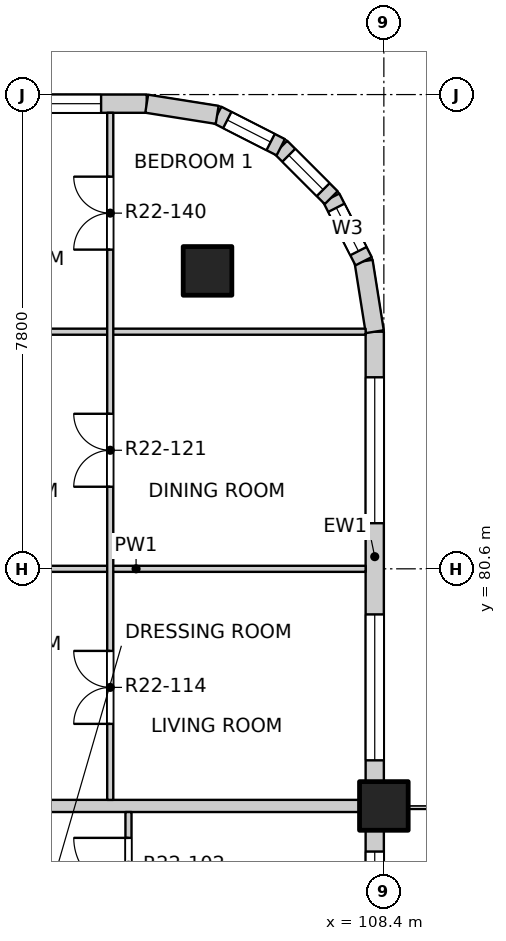
"""IFC4 building model, lengths in metres.
Left out: names, types, materials, properties, quantities, classifications, styles, units other than length and angle.
Written with IfcOpenShell. Run it as: python <this file> out.ifc"""

import sys

from ifc_helpers import new_model, si_unit, direction, frame, frame_2d, origin, origin_2d, place, context, subcontext, project, spatial, rectangle, extrude, element, fill, save


model = new_model("IFC4")
c1 = context("Model", 3, precision=1e-05, world=origin(), true_north=direction((0.0, 1.0)))
c2 = subcontext(c1, "Body", "Model", "MODEL_VIEW")
j1 = project(units=[si_unit("LENGTHUNIT", "METRE"), si_unit("PLANEANGLEUNIT", "RADIAN")], contexts=[c1])
p1 = place(None, origin())
s1 = spatial("IfcSite", under=j1, at=p1, CompositionType="ELEMENT")
p2 = place(p1, origin())
s2 = spatial("IfcBuilding", under=s1, at=p2, CompositionType="ELEMENT")
p3 = place(p2, frame((0.0, 0.0, 231.3)))
s3 = spatial("IfcBuildingStorey", under=s2, at=p3, CompositionType="ELEMENT", Elevation=231.3)
for number, where, z_axis, x_axis in (
    (1, (105.5, 85.5, -0.25), (0.0, 0.0, 1.0), (1.0, 0.0, 0.0)),
    (2, (108.4, 76.7, -0.25), (0.0, 0.0, 1.0), (1.0, 0.0, 0.0)),
):
    element("IfcColumn", number, at=place(p3, frame(where, z_axis=z_axis, x_axis=x_axis)), inside=s3, PredefinedType="COLUMN", context=c2, shape_type="SweptSolid", body=[
        extrude(rectangle(XDim=0.8, YDim=0.8, at=origin_2d()), origin(), (0.0, 0.0, 1.0), 3.4),
    ])
p4 = place(p3, frame((108.25, 69.3, 0.0), z_axis=(0.0, 0.0, 1.0), x_axis=(0.0, 1.0, 0.0)))
e3 = element("IfcWall", 3, at=p4, inside=s3, PredefinedType="SOLIDWALL", context=c2, shape_type="SweptSolid", body=[
    extrude(rectangle(XDim=7.0, YDim=0.3, at=frame_2d((3.5, 0.0))), origin(), (0.0, 0.0, 1.0), 2.7),
])
p5 = place(p4, frame((0.65, 0.0, 0.0)))
e4 = element("IfcOpeningElement", 4, at=p5, cuts=e3, PredefinedType="OPENING", context=c2, shape_type="SweptSolid", body=[
    extrude(rectangle(XDim=1.8, YDim=2.4, at=frame_2d((0.9, 1.2))), frame((0.0, 0.16, 0.0), z_axis=(0.0, -1.0, 0.0), x_axis=(1.0, 0.0, 0.0)), (0.0, 0.0, 1.0), 0.32),
])
p6 = place(p4, frame((4.25, 0.0, 0.9)))
e5 = element("IfcOpeningElement", 5, at=p6, cuts=e3, PredefinedType="OPENING", context=c2, shape_type="SweptSolid", body=[
    extrude(rectangle(XDim=2.4, YDim=1.8, at=frame_2d((1.2, 0.9))), frame((0.0, 0.16, 0.0), z_axis=(0.0, -1.0, 0.0), x_axis=(1.0, 0.0, 0.0)), (0.0, 0.0, 1.0), 0.32),
])
p7 = place(p3, frame((108.25, 77.1, 0.0), z_axis=(0.0, 0.0, 1.0), x_axis=(0.0, 1.0, 0.0)))
e6 = element("IfcWall", 6, at=p7, inside=s3, PredefinedType="SOLIDWALL", context=c2, shape_type="SweptSolid", body=[
    extrude(rectangle(XDim=7.4, YDim=0.3, at=frame_2d((3.7, 0.0))), origin(), (0.0, 0.0, 1.0), 2.7),
])
p8 = place(p7, frame((0.35, 0.0, 0.9)))
e7 = element("IfcOpeningElement", 7, at=p8, cuts=e6, PredefinedType="OPENING", context=c2, shape_type="SweptSolid", body=[
    extrude(rectangle(XDim=2.4, YDim=1.8, at=frame_2d((1.2, 0.9))), frame((0.0, 0.16, 0.0), z_axis=(0.0, -1.0, 0.0), x_axis=(1.0, 0.0, 0.0)), (0.0, 0.0, 1.0), 0.32),
])
p9 = place(p7, frame((4.25, 0.0, 0.9)))
e8 = element("IfcOpeningElement", 8, at=p9, cuts=e6, PredefinedType="OPENING", context=c2, shape_type="SweptSolid", body=[
    extrude(rectangle(XDim=2.4, YDim=1.8, at=frame_2d((1.2, 0.9))), frame((0.0, 0.16, 0.0), z_axis=(0.0, -1.0, 0.0), x_axis=(1.0, 0.0, 0.0)), (0.0, 0.0, 1.0), 0.32),
])
p10 = place(p3, frame((97.1, 88.25, 0.0), z_axis=(0.0, 0.0, 1.0), x_axis=(1.0, 0.0, 0.0)))
e9 = element("IfcWall", 9, at=p10, inside=s3, PredefinedType="SOLIDWALL", context=c2, shape_type="SweptSolid", body=[
    extrude(rectangle(XDim=7.4, YDim=0.3, at=frame_2d((3.7, 0.0))), origin(), (0.0, 0.0, 1.0), 2.7),
])
p11 = place(p10, frame((0.35, 0.0, 0.9)))
e10 = element("IfcOpeningElement", 10, at=p11, cuts=e9, PredefinedType="OPENING", context=c2, shape_type="SweptSolid", body=[
    extrude(rectangle(XDim=2.4, YDim=1.8, at=frame_2d((1.2, 0.9))), frame((0.0, 0.16, 0.0), z_axis=(0.0, -1.0, 0.0), x_axis=(1.0, 0.0, 0.0)), (0.0, 0.0, 1.0), 0.32),
])
p12 = place(p10, frame((4.25, 0.0, 0.9)))
e11 = element("IfcOpeningElement", 11, at=p12, cuts=e9, PredefinedType="OPENING", context=c2, shape_type="SweptSolid", body=[
    extrude(rectangle(XDim=2.4, YDim=1.8, at=frame_2d((1.2, 0.9))), frame((0.0, 0.16, 0.0), z_axis=(0.0, -1.0, 0.0), x_axis=(1.0, 0.0, 0.0)), (0.0, 0.0, 1.0), 0.32),
])
p13 = place(p3, frame((108.25, 84.5, 0.0), z_axis=(0.0, 0.0, 1.0), x_axis=(-0.156496880861, 0.987678452879, 0.0)))
e12 = element("IfcWall", 12, at=p13, inside=s3, PredefinedType="SOLIDWALL", context=c2, shape_type="SweptSolid", body=[
    extrude(rectangle(XDim=1.173, YDim=0.3, at=frame_2d((0.586, 0.0))), origin(), (0.0, 0.0, 1.0), 2.7),
])
p14 = place(p3, frame((108.066, 85.659, 0.0), z_axis=(0.0, 0.0, 1.0), x_axis=(-0.454025524128, 0.890988677504, 0.0)))
e13 = element("IfcWall", 13, at=p14, inside=s3, PredefinedType="SOLIDWALL", context=c2, shape_type="SweptSolid", body=[
    extrude(rectangle(XDim=1.173, YDim=0.3, at=frame_2d((0.587, 0.0))), origin(), (0.0, 0.0, 1.0), 2.7),
])
p15 = place(p14, frame((0.187, 0.0, 0.9)))
e14 = element("IfcOpeningElement", 14, at=p15, cuts=e13, PredefinedType="OPENING", context=c2, shape_type="SweptSolid", body=[
    extrude(rectangle(XDim=0.8, YDim=1.2, at=frame_2d((0.4, 0.6))), frame((0.0, 0.16, 0.0), z_axis=(0.0, -1.0, 0.0), x_axis=(1.0, 0.0, 0.0)), (0.0, 0.0, 1.0), 0.32),
])
p16 = place(p3, frame((107.534, 86.704, 0.0), z_axis=(0.0, 0.0, 1.0), x_axis=(-0.707106781187, 0.707106781187, 0.0)))
e15 = element("IfcWall", 15, at=p16, inside=s3, PredefinedType="SOLIDWALL", context=c2, shape_type="SweptSolid", body=[
    extrude(rectangle(XDim=1.173, YDim=0.3, at=frame_2d((0.586, 0.0))), origin(), (0.0, 0.0, 1.0), 2.7),
])
p17 = place(p16, frame((0.187, 0.0, 0.9)))
e16 = element("IfcOpeningElement", 16, at=p17, cuts=e15, PredefinedType="OPENING", context=c2, shape_type="SweptSolid", body=[
    extrude(rectangle(XDim=0.8, YDim=1.2, at=frame_2d((0.4, 0.6))), frame((0.0, 0.16, 0.0), z_axis=(0.0, -1.0, 0.0), x_axis=(1.0, 0.0, 0.0)), (0.0, 0.0, 1.0), 0.32),
])
p18 = place(p3, frame((106.704, 87.534, 0.0), z_axis=(0.0, 0.0, 1.0), x_axis=(-0.890988677504, 0.454025524128, 0.0)))
e17 = element("IfcWall", 17, at=p18, inside=s3, PredefinedType="SOLIDWALL", context=c2, shape_type="SweptSolid", body=[
    extrude(rectangle(XDim=1.173, YDim=0.3, at=frame_2d((0.587, 0.0))), origin(), (0.0, 0.0, 1.0), 2.7),
])
p19 = place(p18, frame((0.187, 0.0, 0.9)))
e18 = element("IfcOpeningElement", 18, at=p19, cuts=e17, PredefinedType="OPENING", context=c2, shape_type="SweptSolid", body=[
    extrude(rectangle(XDim=0.8, YDim=1.2, at=frame_2d((0.4, 0.6))), frame((0.0, 0.16, 0.0), z_axis=(0.0, -1.0, 0.0), x_axis=(1.0, 0.0, 0.0)), (0.0, 0.0, 1.0), 0.32),
])
p20 = place(p3, frame((105.659, 88.066, 0.0), z_axis=(0.0, 0.0, 1.0), x_axis=(-0.987678452879, 0.156496880861, 0.0)))
e19 = element("IfcWall", 19, at=p20, inside=s3, PredefinedType="SOLIDWALL", context=c2, shape_type="SweptSolid", body=[
    extrude(rectangle(XDim=1.173, YDim=0.3, at=frame_2d((0.586, 0.0))), origin(), (0.0, 0.0, 1.0), 2.7),
])
p21 = place(p3, frame((96.6, 76.7, 0.0), z_axis=(0.0, 0.0, 1.0), x_axis=(1.0, 0.0, 0.0)))
e20 = element("IfcWall", 20, at=p21, inside=s3, PredefinedType="PARTITIONING", context=c2, shape_type="SweptSolid", body=[
    extrude(rectangle(XDim=11.5, YDim=0.2, at=frame_2d((5.75, 0.0))), origin(), (0.0, 0.0, 1.0), 2.55),
])
p22 = place(p3, frame((100.55, 80.6, 0.0), z_axis=(0.0, 0.0, 1.0), x_axis=(1.0, 0.0, 0.0)))
e21 = element("IfcWall", 21, at=p22, inside=s3, PredefinedType="PARTITIONING", context=c2, shape_type="SweptSolid", body=[
    extrude(rectangle(XDim=7.55, YDim=0.1, at=frame_2d((3.775, 0.0))), origin(), (0.0, 0.0, 1.0), 3.15),
])
p23 = place(p3, frame((96.6, 84.5, 0.0), z_axis=(0.0, 0.0, 1.0), x_axis=(1.0, 0.0, 0.0)))
e22 = element("IfcWall", 22, at=p23, inside=s3, PredefinedType="PARTITIONING", context=c2, shape_type="SweptSolid", body=[
    extrude(rectangle(XDim=11.5, YDim=0.1, at=frame_2d((5.75, 0.0))), origin(), (0.0, 0.0, 1.0), 3.15),
])
p24 = place(p23, frame((2.635, 0.0, 0.0)))
e23 = element("IfcOpeningElement", 23, at=p24, cuts=e22, PredefinedType="OPENING", context=c2, shape_type="SweptSolid", body=[
    extrude(rectangle(XDim=0.9, YDim=2.1, at=frame_2d((0.45, 1.05))), frame((0.0, 0.06, 0.0), z_axis=(0.0, -1.0, 0.0), x_axis=(1.0, 0.0, 0.0)), (0.0, 0.0, 1.0), 0.12),
])
p25 = place(p3, frame((103.9, 76.8, 0.0), z_axis=(0.0, 0.0, 1.0), x_axis=(0.0, 1.0, 0.0)))
e24 = element("IfcWall", 24, at=p25, inside=s3, PredefinedType="PARTITIONING", context=c2, shape_type="SweptSolid", body=[
    extrude(rectangle(XDim=11.3, YDim=0.1, at=frame_2d((5.65, 0.0))), origin(), (0.0, 0.0, 1.0), 3.15),
])
p26 = place(p25, frame((1.25, 0.0, 0.0)))
e25 = element("IfcOpeningElement", 25, at=p26, cuts=e24, PredefinedType="OPENING", context=c2, shape_type="SweptSolid", body=[
    extrude(rectangle(XDim=1.2, YDim=2.1, at=frame_2d((0.6, 1.05))), frame((0.0, 0.06, 0.0), z_axis=(0.0, -1.0, 0.0), x_axis=(1.0, 0.0, 0.0)), (0.0, 0.0, 1.0), 0.12),
])
p27 = place(p25, frame((5.15, 0.0, 0.0)))
e26 = element("IfcOpeningElement", 26, at=p27, cuts=e24, PredefinedType="OPENING", context=c2, shape_type="SweptSolid", body=[
    extrude(rectangle(XDim=1.2, YDim=2.1, at=frame_2d((0.6, 1.05))), frame((0.0, 0.06, 0.0), z_axis=(0.0, -1.0, 0.0), x_axis=(1.0, 0.0, 0.0)), (0.0, 0.0, 1.0), 0.12),
])
p28 = place(p25, frame((9.05, 0.0, 0.0)))
e27 = element("IfcOpeningElement", 27, at=p28, cuts=e24, PredefinedType="OPENING", context=c2, shape_type="SweptSolid", body=[
    extrude(rectangle(XDim=1.2, YDim=2.1, at=frame_2d((0.6, 1.05))), frame((0.0, 0.06, 0.0), z_axis=(0.0, -1.0, 0.0), x_axis=(1.0, 0.0, 0.0)), (0.0, 0.0, 1.0), 0.12),
])
p29 = place(p3, frame((104.2, 41.9, 0.0), z_axis=(0.0, 0.0, 1.0), x_axis=(0.0, 1.0, 0.0)))
e28 = element("IfcWall", 28, at=p29, inside=s3, PredefinedType="PARTITIONING", context=c2, shape_type="SweptSolid", body=[
    extrude(rectangle(XDim=34.7, YDim=0.1, at=frame_2d((17.35, 0.0))), origin(), (0.0, 0.0, 1.0), 3.15),
])
p30 = place(p29, frame((1.05, 0.0, 0.0)))
e29 = element("IfcOpeningElement", 29, at=p30, cuts=e28, PredefinedType="OPENING", context=c2, shape_type="SweptSolid", body=[
    extrude(rectangle(XDim=1.2, YDim=2.1, at=frame_2d((0.6, 1.05))), frame((0.0, 0.06, 0.0), z_axis=(0.0, -1.0, 0.0), x_axis=(1.0, 0.0, 0.0)), (0.0, 0.0, 1.0), 0.12),
])
p31 = place(p29, frame((4.125, 0.0, 0.0)))
e30 = element("IfcOpeningElement", 30, at=p31, cuts=e28, PredefinedType="OPENING", context=c2, shape_type="SweptSolid", body=[
    extrude(rectangle(XDim=0.9, YDim=2.1, at=frame_2d((0.45, 1.05))), frame((0.0, 0.06, 0.0), z_axis=(0.0, -1.0, 0.0), x_axis=(1.0, 0.0, 0.0)), (0.0, 0.0, 1.0), 0.12),
])
p32 = place(p29, frame((6.075, 0.0, 0.0)))
e31 = element("IfcOpeningElement", 31, at=p32, cuts=e28, PredefinedType="OPENING", context=c2, shape_type="SweptSolid", body=[
    extrude(rectangle(XDim=0.9, YDim=2.1, at=frame_2d((0.45, 1.05))), frame((0.0, 0.06, 0.0), z_axis=(0.0, -1.0, 0.0), x_axis=(1.0, 0.0, 0.0)), (0.0, 0.0, 1.0), 0.12),
])
p33 = place(p29, frame((8.85, 0.0, 0.0)))
e32 = element("IfcOpeningElement", 32, at=p33, cuts=e28, PredefinedType="OPENING", context=c2, shape_type="SweptSolid", body=[
    extrude(rectangle(XDim=1.2, YDim=2.1, at=frame_2d((0.6, 1.05))), frame((0.0, 0.06, 0.0), z_axis=(0.0, -1.0, 0.0), x_axis=(1.0, 0.0, 0.0)), (0.0, 0.0, 1.0), 0.12),
])
p34 = place(p29, frame((12.75, 0.0, 0.0)))
e33 = element("IfcOpeningElement", 33, at=p34, cuts=e28, PredefinedType="OPENING", context=c2, shape_type="SweptSolid", body=[
    extrude(rectangle(XDim=1.2, YDim=2.1, at=frame_2d((0.6, 1.05))), frame((0.0, 0.06, 0.0), z_axis=(0.0, -1.0, 0.0), x_axis=(1.0, 0.0, 0.0)), (0.0, 0.0, 1.0), 0.12),
])
p35 = place(p29, frame((15.825, 0.0, 0.0)))
e34 = element("IfcOpeningElement", 34, at=p35, cuts=e28, PredefinedType="OPENING", context=c2, shape_type="SweptSolid", body=[
    extrude(rectangle(XDim=0.9, YDim=2.1, at=frame_2d((0.45, 1.05))), frame((0.0, 0.06, 0.0), z_axis=(0.0, -1.0, 0.0), x_axis=(1.0, 0.0, 0.0)), (0.0, 0.0, 1.0), 0.12),
])
p36 = place(p29, frame((17.775, 0.0, 0.0)))
e35 = element("IfcOpeningElement", 35, at=p36, cuts=e28, PredefinedType="OPENING", context=c2, shape_type="SweptSolid", body=[
    extrude(rectangle(XDim=0.9, YDim=2.1, at=frame_2d((0.45, 1.05))), frame((0.0, 0.06, 0.0), z_axis=(0.0, -1.0, 0.0), x_axis=(1.0, 0.0, 0.0)), (0.0, 0.0, 1.0), 0.12),
])
p37 = place(p29, frame((19.725, 0.0, 0.0)))
e36 = element("IfcOpeningElement", 36, at=p37, cuts=e28, PredefinedType="OPENING", context=c2, shape_type="SweptSolid", body=[
    extrude(rectangle(XDim=0.9, YDim=2.1, at=frame_2d((0.45, 1.05))), frame((0.0, 0.06, 0.0), z_axis=(0.0, -1.0, 0.0), x_axis=(1.0, 0.0, 0.0)), (0.0, 0.0, 1.0), 0.12),
])
p38 = place(p29, frame((21.675, 0.0, 0.0)))
e37 = element("IfcOpeningElement", 37, at=p38, cuts=e28, PredefinedType="OPENING", context=c2, shape_type="SweptSolid", body=[
    extrude(rectangle(XDim=0.9, YDim=2.1, at=frame_2d((0.45, 1.05))), frame((0.0, 0.06, 0.0), z_axis=(0.0, -1.0, 0.0), x_axis=(1.0, 0.0, 0.0)), (0.0, 0.0, 1.0), 0.12),
])
p39 = place(p29, frame((23.625, 0.0, 0.0)))
e38 = element("IfcOpeningElement", 38, at=p39, cuts=e28, PredefinedType="OPENING", context=c2, shape_type="SweptSolid", body=[
    extrude(rectangle(XDim=0.9, YDim=2.1, at=frame_2d((0.45, 1.05))), frame((0.0, 0.06, 0.0), z_axis=(0.0, -1.0, 0.0), x_axis=(1.0, 0.0, 0.0)), (0.0, 0.0, 1.0), 0.12),
])
p40 = place(p29, frame((25.575, 0.0, 0.0)))
e39 = element("IfcOpeningElement", 39, at=p40, cuts=e28, PredefinedType="OPENING", context=c2, shape_type="SweptSolid", body=[
    extrude(rectangle(XDim=0.9, YDim=2.1, at=frame_2d((0.45, 1.05))), frame((0.0, 0.06, 0.0), z_axis=(0.0, -1.0, 0.0), x_axis=(1.0, 0.0, 0.0)), (0.0, 0.0, 1.0), 0.12),
])
p41 = place(p29, frame((28.35, 0.0, 0.0)))
e40 = element("IfcOpeningElement", 40, at=p41, cuts=e28, PredefinedType="OPENING", context=c2, shape_type="SweptSolid", body=[
    extrude(rectangle(XDim=1.2, YDim=2.1, at=frame_2d((0.6, 1.05))), frame((0.0, 0.06, 0.0), z_axis=(0.0, -1.0, 0.0), x_axis=(1.0, 0.0, 0.0)), (0.0, 0.0, 1.0), 0.12),
])
p42 = place(p29, frame((31.425, 0.0, 0.0)))
e41 = element("IfcOpeningElement", 41, at=p42, cuts=e28, PredefinedType="OPENING", context=c2, shape_type="SweptSolid", body=[
    extrude(rectangle(XDim=0.9, YDim=2.1, at=frame_2d((0.45, 1.05))), frame((0.0, 0.06, 0.0), z_axis=(0.0, -1.0, 0.0), x_axis=(1.0, 0.0, 0.0)), (0.0, 0.0, 1.0), 0.12),
])
p43 = place(p29, frame((33.375, 0.0, 0.0)))
e42 = element("IfcOpeningElement", 42, at=p43, cuts=e28, PredefinedType="OPENING", context=c2, shape_type="SweptSolid", body=[
    extrude(rectangle(XDim=0.9, YDim=2.1, at=frame_2d((0.45, 1.05))), frame((0.0, 0.06, 0.0), z_axis=(0.0, -1.0, 0.0), x_axis=(1.0, 0.0, 0.0)), (0.0, 0.0, 1.0), 0.12),
])
p44 = place(p6, origin())
e43 = element("IfcWindow", 43, at=p44, inside=s3, PartitioningType="DOUBLE_PANEL_VERTICAL", PredefinedType="WINDOW", context=c2, shape_type="SweptSolid", body=[
    extrude(rectangle(XDim=2.4, YDim=1.8, at=frame_2d((1.2, 0.9))), frame((0.0, 0.03, 0.0), z_axis=(0.0, -1.0, 0.0), x_axis=(1.0, 0.0, 0.0)), (0.0, 0.0, 1.0), 0.06),
])
fill(e5, e43)
p45 = place(p8, origin())
e44 = element("IfcWindow", 44, at=p45, inside=s3, PartitioningType="DOUBLE_PANEL_VERTICAL", PredefinedType="WINDOW", context=c2, shape_type="SweptSolid", body=[
    extrude(rectangle(XDim=2.4, YDim=1.8, at=frame_2d((1.2, 0.9))), frame((0.0, 0.03, 0.0), z_axis=(0.0, -1.0, 0.0), x_axis=(1.0, 0.0, 0.0)), (0.0, 0.0, 1.0), 0.06),
])
fill(e7, e44)
p46 = place(p9, origin())
e45 = element("IfcWindow", 45, at=p46, inside=s3, PartitioningType="DOUBLE_PANEL_VERTICAL", PredefinedType="WINDOW", context=c2, shape_type="SweptSolid", body=[
    extrude(rectangle(XDim=2.4, YDim=1.8, at=frame_2d((1.2, 0.9))), frame((0.0, 0.03, 0.0), z_axis=(0.0, -1.0, 0.0), x_axis=(1.0, 0.0, 0.0)), (0.0, 0.0, 1.0), 0.06),
])
fill(e8, e45)
p47 = place(p12, origin())
e46 = element("IfcWindow", 46, at=p47, inside=s3, PartitioningType="DOUBLE_PANEL_VERTICAL", PredefinedType="WINDOW", context=c2, shape_type="SweptSolid", body=[
    extrude(rectangle(XDim=2.4, YDim=1.8, at=frame_2d((1.2, 0.9))), frame((0.0, 0.03, 0.0), z_axis=(0.0, -1.0, 0.0), x_axis=(1.0, 0.0, 0.0)), (0.0, 0.0, 1.0), 0.06),
])
fill(e11, e46)
p48 = place(p15, origin())
e47 = element("IfcWindow", 47, at=p48, inside=s3, PartitioningType="SINGLE_PANEL", PredefinedType="WINDOW", context=c2, shape_type="SweptSolid", body=[
    extrude(rectangle(XDim=0.8, YDim=1.2, at=frame_2d((0.4, 0.6))), frame((0.0, 0.03, 0.0), z_axis=(0.0, -1.0, 0.0), x_axis=(1.0, 0.0, 0.0)), (0.0, 0.0, 1.0), 0.06),
])
fill(e14, e47)
p49 = place(p17, origin())
e48 = element("IfcWindow", 48, at=p49, inside=s3, PartitioningType="SINGLE_PANEL", PredefinedType="WINDOW", context=c2, shape_type="SweptSolid", body=[
    extrude(rectangle(XDim=0.8, YDim=1.2, at=frame_2d((0.4, 0.6))), frame((0.0, 0.03, 0.0), z_axis=(0.0, -1.0, 0.0), x_axis=(1.0, 0.0, 0.0)), (0.0, 0.0, 1.0), 0.06),
])
fill(e16, e48)
p50 = place(p19, origin())
e49 = element("IfcWindow", 49, at=p50, inside=s3, PartitioningType="SINGLE_PANEL", PredefinedType="WINDOW", context=c2, shape_type="SweptSolid", body=[
    extrude(rectangle(XDim=0.8, YDim=1.2, at=frame_2d((0.4, 0.6))), frame((0.0, 0.03, 0.0), z_axis=(0.0, -1.0, 0.0), x_axis=(1.0, 0.0, 0.0)), (0.0, 0.0, 1.0), 0.06),
])
fill(e18, e49)
p51 = place(p43, origin())
e50 = element("IfcDoor", 50, at=p51, inside=s3, OperationType="SINGLE_SWING_RIGHT", PredefinedType="DOOR", context=c2, shape_type="SweptSolid", body=[
    extrude(rectangle(XDim=0.9, YDim=2.1, at=frame_2d((0.45, 1.05))), frame((0.0, 0.025, 0.0), z_axis=(0.0, -1.0, 0.0), x_axis=(1.0, 0.0, 0.0)), (0.0, 0.0, 1.0), 0.05),
])
fill(e42, e50)
p52 = place(p26, origin())
e51 = element("IfcDoor", 51, at=p52, inside=s3, OperationType="DOUBLE_DOOR_SINGLE_SWING", PredefinedType="DOOR", context=c2, shape_type="SweptSolid", body=[
    extrude(rectangle(XDim=1.2, YDim=2.1, at=frame_2d((0.6, 1.05))), frame((0.0, 0.025, 0.0), z_axis=(0.0, -1.0, 0.0), x_axis=(1.0, 0.0, 0.0)), (0.0, 0.0, 1.0), 0.05),
])
fill(e25, e51)
p53 = place(p27, origin())
e52 = element("IfcDoor", 52, at=p53, inside=s3, OperationType="DOUBLE_DOOR_SINGLE_SWING", PredefinedType="DOOR", context=c2, shape_type="SweptSolid", body=[
    extrude(rectangle(XDim=1.2, YDim=2.1, at=frame_2d((0.6, 1.05))), frame((0.0, 0.025, 0.0), z_axis=(0.0, -1.0, 0.0), x_axis=(1.0, 0.0, 0.0)), (0.0, 0.0, 1.0), 0.05),
])
fill(e26, e52)
p54 = place(p28, origin())
e53 = element("IfcDoor", 53, at=p54, inside=s3, OperationType="DOUBLE_DOOR_SINGLE_SWING", PredefinedType="DOOR", context=c2, shape_type="SweptSolid", body=[
    extrude(rectangle(XDim=1.2, YDim=2.1, at=frame_2d((0.6, 1.05))), frame((0.0, 0.025, 0.0), z_axis=(0.0, -1.0, 0.0), x_axis=(1.0, 0.0, 0.0)), (0.0, 0.0, 1.0), 0.05),
])
fill(e27, e53)
save(model, sys.argv[1])
